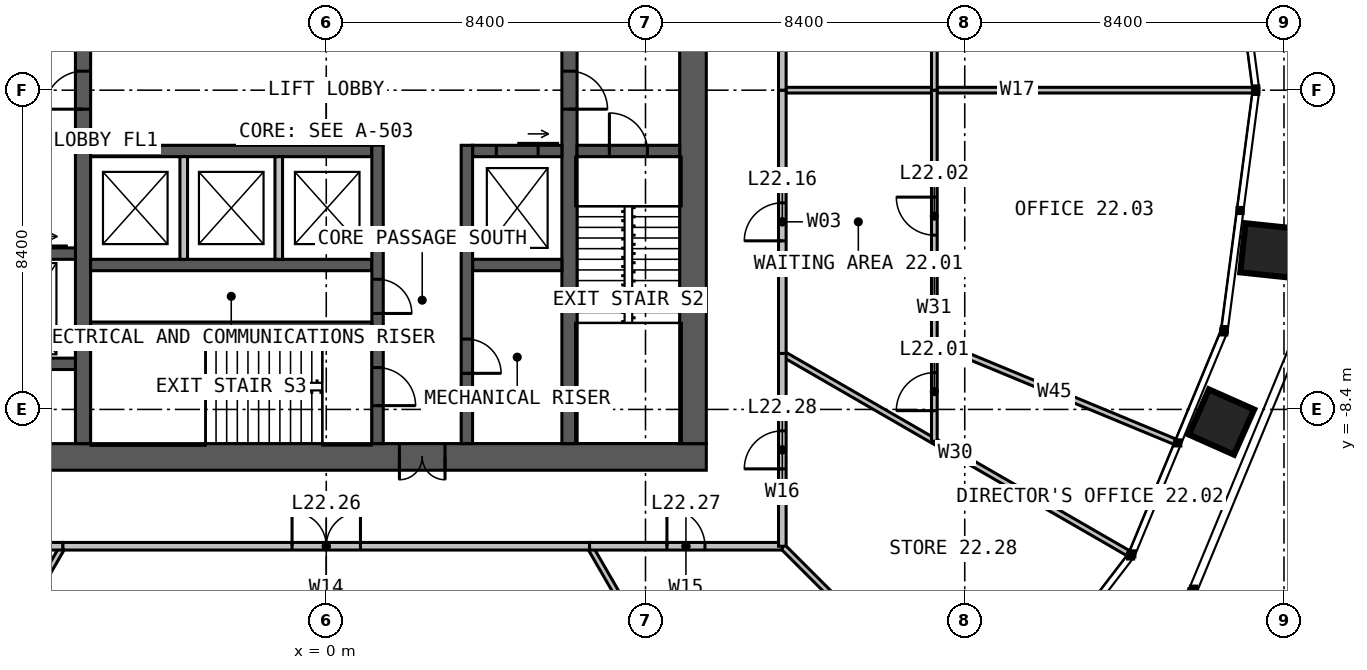
"""IFC4 building model, lengths in metres.
Left out: names, types, materials, properties, quantities, classifications, styles, units other than length and angle.
Written with IfcOpenShell. Run it as: python <this file> out.ifc"""

import sys

from ifc_helpers import new_model, si_unit, direction, frame, frame_2d, origin, place, context, subcontext, project, spatial, rectangle, extrude, element, fill, save


model = new_model("IFC4")
c1 = context("Model", 3, precision=1e-05, world=origin(), true_north=direction((0.0, 1.0)))
c2 = subcontext(c1, "Body", "Model", "MODEL_VIEW")
j1 = project(units=[si_unit("LENGTHUNIT", "METRE"), si_unit("PLANEANGLEUNIT", "RADIAN")], contexts=[c1])
p1 = place(None, origin())
s1 = spatial("IfcSite", under=j1, at=p1, CompositionType="ELEMENT")
p2 = place(p1, origin())
s2 = spatial("IfcBuilding", under=s1, at=p2, CompositionType="ELEMENT")
p3 = place(p2, frame((0.0, 0.0, 94.0)))
s3 = spatial("IfcBuildingStorey", under=s2, at=p3, CompositionType="ELEMENT", Elevation=94.0)
p4 = place(p3, frame((10.0, -9.65, 0.0), z_axis=(0.0, 0.0, 1.0), x_axis=(-1.0, 0.0, 0.0)))
e1 = element("IfcWall", 1, at=p4, inside=s3, PredefinedType="SOLIDWALL", context=c2, shape_type="SweptSolid", body=[
    extrude(rectangle(XDim=20.0, YDim=0.7, at=frame_2d((10.0, 0.0))), origin(), (0.0, 0.0, 1.0), 4.0),
])
p5 = place(p4, frame((6.875, 0.0, 0.0)))
e2 = element("IfcOpeningElement", 2, at=p5, cuts=e1, PredefinedType="OPENING", context=c2, shape_type="SweptSolid", body=[
    extrude(rectangle(XDim=1.2, YDim=2.2, at=frame_2d((0.6, 1.1))), frame((0.0, 0.36, 0.0), z_axis=(0.0, -1.0, 0.0), x_axis=(1.0, 0.0, 0.0)), (0.0, 0.0, 1.0), 0.72),
])
p6 = place(p3, frame((9.65, -9.3, 0.0), z_axis=(0.0, 0.0, 1.0), x_axis=(0.0, 1.0, 0.0)))
e3 = element("IfcWall", 3, at=p6, inside=s3, PredefinedType="SOLIDWALL", context=c2, shape_type="SweptSolid", body=[
    extrude(rectangle(XDim=18.6, YDim=0.7, at=frame_2d((9.3, 0.0))), origin(), (0.0, 0.0, 1.0), 4.0),
])
p7 = place(p3, frame((-6.4, -9.3, 0.0), z_axis=(0.0, 0.0, 1.0), x_axis=(0.0, 1.0, 0.0)))
e4 = element("IfcWall", 4, at=p7, inside=s3, PredefinedType="SOLIDWALL", context=c2, shape_type="SweptSolid", body=[
    extrude(rectangle(XDim=18.6, YDim=0.4, at=frame_2d((9.3, 0.0))), origin(), (0.0, 0.0, 1.0), 4.0),
])
p8 = place(p7, frame((8.8, 0.0, 0.0)))
e5 = element("IfcOpeningElement", 5, at=p8, cuts=e4, PredefinedType="OPENING", context=c2, shape_type="SweptSolid", body=[
    extrude(rectangle(XDim=1.0, YDim=2.2, at=frame_2d((0.5, 1.1))), frame((0.0, 0.21, 0.0), z_axis=(0.0, -1.0, 0.0), x_axis=(1.0, 0.0, 0.0)), (0.0, 0.0, 1.0), 0.42),
])
p9 = place(p3, frame((6.4, 9.3, 0.0), z_axis=(0.0, 0.0, 1.0), x_axis=(0.0, -1.0, 0.0)))
e6 = element("IfcWall", 6, at=p9, inside=s3, PredefinedType="SOLIDWALL", context=c2, shape_type="SweptSolid", body=[
    extrude(rectangle(XDim=18.6, YDim=0.4, at=frame_2d((9.3, 0.0))), origin(), (0.0, 0.0, 1.0), 4.0),
])
p10 = place(p9, frame((8.8, 0.0, 0.0)))
e7 = element("IfcOpeningElement", 7, at=p10, cuts=e6, PredefinedType="OPENING", context=c2, shape_type="SweptSolid", body=[
    extrude(rectangle(XDim=1.0, YDim=2.2, at=frame_2d((0.5, 1.1))), frame((0.0, 0.21, 0.0), z_axis=(0.0, -1.0, 0.0), x_axis=(1.0, 0.0, 0.0)), (0.0, 0.0, 1.0), 0.42),
])
p11 = place(p3, frame((-6.2, -1.6, 0.0), z_axis=(0.0, 0.0, 1.0), x_axis=(1.0, 0.0, 0.0)))
e8 = element("IfcWall", 8, at=p11, inside=s3, PredefinedType="SOLIDWALL", context=c2, shape_type="SweptSolid", body=[
    extrude(rectangle(XDim=7.4, YDim=0.3, at=frame_2d((3.7, 0.0))), origin(), (0.0, 0.0, 1.0), 4.0),
])
p12 = place(p3, frame((3.85, -1.6, 0.0), z_axis=(0.0, 0.0, 1.0), x_axis=(1.0, 0.0, 0.0)))
e9 = element("IfcWall", 9, at=p12, inside=s3, PredefinedType="SOLIDWALL", context=c2, shape_type="SweptSolid", body=[
    extrude(rectangle(XDim=2.35, YDim=0.3, at=frame_2d((1.175, 0.0))), origin(), (0.0, 0.0, 1.0), 4.0),
])
p13 = place(p12, frame((0.625, 0.0, 0.0)))
e10 = element("IfcOpeningElement", 10, at=p13, cuts=e9, PredefinedType="OPENING", context=c2, shape_type="SweptSolid", body=[
    extrude(rectangle(XDim=1.1, YDim=2.2, at=frame_2d((0.55, 1.1))), frame((0.0, 0.16, 0.0), z_axis=(0.0, -1.0, 0.0), x_axis=(1.0, 0.0, 0.0)), (0.0, 0.0, 1.0), 0.32),
])
p14 = place(p3, frame((-6.2, -4.6, 0.0), z_axis=(0.0, 0.0, 1.0), x_axis=(1.0, 0.0, 0.0)))
e11 = element("IfcWall", 11, at=p14, inside=s3, PredefinedType="SOLIDWALL", context=c2, shape_type="SweptSolid", body=[
    extrude(rectangle(XDim=7.4, YDim=0.3, at=frame_2d((3.7, 0.0))), origin(), (0.0, 0.0, 1.0), 4.0),
])
p15 = place(p3, frame((3.85, -4.6, 0.0), z_axis=(0.0, 0.0, 1.0), x_axis=(1.0, 0.0, 0.0)))
e12 = element("IfcWall", 12, at=p15, inside=s3, PredefinedType="SOLIDWALL", context=c2, shape_type="SweptSolid", body=[
    extrude(rectangle(XDim=2.35, YDim=0.3, at=frame_2d((1.175, 0.0))), origin(), (0.0, 0.0, 1.0), 4.0),
])
p16 = place(p3, frame((1.35, -1.45, 0.0), z_axis=(0.0, 0.0, 1.0), x_axis=(0.0, -1.0, 0.0)))
e13 = element("IfcWall", 13, at=p16, inside=s3, PredefinedType="SOLIDWALL", context=c2, shape_type="SweptSolid", body=[
    extrude(rectangle(XDim=7.85, YDim=0.3, at=frame_2d((3.925, 0.0))), origin(), (0.0, 0.0, 1.0), 4.0),
])
p17 = place(p16, frame((5.85, 0.0, 0.0)))
e14 = element("IfcOpeningElement", 14, at=p17, cuts=e13, PredefinedType="OPENING", context=c2, shape_type="SweptSolid", body=[
    extrude(rectangle(XDim=1.0, YDim=2.2, at=frame_2d((0.5, 1.1))), frame((0.0, 0.16, 0.0), z_axis=(0.0, -1.0, 0.0), x_axis=(1.0, 0.0, 0.0)), (0.0, 0.0, 1.0), 0.32),
])
p18 = place(p16, frame((3.525, 0.0, 0.0)))
e15 = element("IfcOpeningElement", 15, at=p18, cuts=e13, PredefinedType="OPENING", context=c2, shape_type="SweptSolid", body=[
    extrude(rectangle(XDim=0.9, YDim=2.2, at=frame_2d((0.45, 1.1))), frame((0.0, 0.16, 0.0), z_axis=(0.0, -1.0, 0.0), x_axis=(1.0, 0.0, 0.0)), (0.0, 0.0, 1.0), 0.32),
])
p19 = place(p3, frame((3.7, -1.45, 0.0), z_axis=(0.0, 0.0, 1.0), x_axis=(0.0, -1.0, 0.0)))
e16 = element("IfcWall", 16, at=p19, inside=s3, PredefinedType="SOLIDWALL", context=c2, shape_type="SweptSolid", body=[
    extrude(rectangle(XDim=7.85, YDim=0.3, at=frame_2d((3.925, 0.0))), origin(), (0.0, 0.0, 1.0), 4.0),
])
p20 = place(p19, frame((5.1, 0.0, 0.0)))
e17 = element("IfcOpeningElement", 17, at=p20, cuts=e16, PredefinedType="OPENING", context=c2, shape_type="SweptSolid", body=[
    extrude(rectangle(XDim=0.9, YDim=2.2, at=frame_2d((0.45, 1.1))), frame((0.0, 0.16, 0.0), z_axis=(0.0, -1.0, 0.0), x_axis=(1.0, 0.0, 0.0)), (0.0, 0.0, 1.0), 0.32),
])
p21 = place(p3, frame((-6.2, -6.2, 0.0), z_axis=(0.0, 0.0, 1.0), x_axis=(1.0, 0.0, 0.0)))
e18 = element("IfcWall", 18, at=p21, inside=s3, PredefinedType="SOLIDWALL", context=c2, shape_type="SweptSolid", body=[
    extrude(rectangle(XDim=7.4, YDim=0.2, at=frame_2d((3.7, 0.0))), origin(), (0.0, 0.0, 1.0), 4.0),
])
p22 = place(p3, frame((6.6, -1.6, 0.0), z_axis=(0.0, 0.0, 1.0), x_axis=(1.0, 0.0, 0.0)))
e19 = element("IfcWall", 19, at=p22, inside=s3, PredefinedType="SOLIDWALL", context=c2, shape_type="SweptSolid", body=[
    extrude(rectangle(XDim=2.7, YDim=0.3, at=frame_2d((1.35, 0.0))), origin(), (0.0, 0.0, 1.0), 4.0),
])
p23 = place(p22, frame((0.85, 0.0, 0.0)))
e20 = element("IfcOpeningElement", 20, at=p23, cuts=e19, PredefinedType="OPENING", context=c2, shape_type="SweptSolid", body=[
    extrude(rectangle(XDim=1.0, YDim=2.2, at=frame_2d((0.5, 1.1))), frame((0.0, 0.16, 0.0), z_axis=(0.0, -1.0, 0.0), x_axis=(1.0, 0.0, 0.0)), (0.0, 0.0, 1.0), 0.32),
])
p24 = place(p3, frame((-9.3, -4.3, 0.0), z_axis=(0.0, 0.0, 1.0), x_axis=(1.0, 0.0, 0.0)))
e21 = element("IfcWall", 21, at=p24, inside=s3, PredefinedType="SOLIDWALL", context=c2, shape_type="SweptSolid", body=[
    extrude(rectangle(XDim=2.7, YDim=0.3, at=frame_2d((1.35, 0.0))), origin(), (0.0, 0.0, 1.0), 4.0),
])
p25 = place(p24, frame((0.85, 0.0, 0.0)))
e22 = element("IfcOpeningElement", 22, at=p25, cuts=e21, PredefinedType="OPENING", context=c2, shape_type="SweptSolid", body=[
    extrude(rectangle(XDim=1.1, YDim=2.2, at=frame_2d((0.55, 1.1))), frame((0.0, 0.16, 0.0), z_axis=(0.0, -1.0, 0.0), x_axis=(1.0, 0.0, 0.0)), (0.0, 0.0, 1.0), 0.32),
])
p26 = place(p3, frame((-9.3, -7.2, 0.0), z_axis=(0.0, 0.0, 1.0), x_axis=(1.0, 0.0, 0.0)))
e23 = element("IfcWall", 23, at=p26, inside=s3, PredefinedType="SOLIDWALL", context=c2, shape_type="SweptSolid", body=[
    extrude(rectangle(XDim=2.7, YDim=0.3, at=frame_2d((1.35, 0.0))), origin(), (0.0, 0.0, 1.0), 4.0),
])
for number, where, z_axis, x_axis in (
    (24, (-3.75, -1.75, 0.0), (0.0, 0.0, 1.0), (0.0, -1.0, 0.0)),
    (25, (-1.25, -1.75, 0.0), (0.0, 0.0, 1.0), (0.0, -1.0, 0.0)),
):
    element("IfcWall", number, at=place(p3, frame(where, z_axis=z_axis, x_axis=x_axis)), inside=s3, PredefinedType="SOLIDWALL", context=c2, shape_type="SweptSolid", body=[
        extrude(rectangle(XDim=2.7, YDim=0.2, at=frame_2d((1.35, 0.0))), origin(), (0.0, 0.0, 1.0), 3.75),
    ])
p27 = place(p3, frame((12.0, -6.928, 0.0), z_axis=(0.0, 0.0, 1.0), x_axis=(0.866028201971, -0.499995153367, 0.0)))
e26 = element("IfcWall", 26, at=p27, inside=s3, PredefinedType="PARTITIONING", context=c2, shape_type="SweptSolid", body=[
    extrude(rectangle(XDim=10.514, YDim=0.15, at=frame_2d((5.257, 0.0))), origin(), (0.0, 0.0, 1.0), 2.79),
])
p28 = place(p3, frame((12.0, 0.0, 0.0), z_axis=(0.0, 0.0, 1.0), x_axis=(1.0, 0.0, 0.0)))
e27 = element("IfcWall", 27, at=p28, inside=s3, PredefinedType="PARTITIONING", context=c2, shape_type="SweptSolid", body=[
    extrude(rectangle(XDim=12.37, YDim=0.15, at=frame_2d((6.185, 0.0))), origin(), (0.0, 0.0, 1.0), 2.79),
])
for number, where, z_axis, x_axis in (
    (28, (-6.928, -12.0, 0.0), (0.0, 0.0, 1.0), (-0.5, -0.866, 0.0)),
    (29, (6.928, -12.0, 0.0), (0.0, 0.0, 1.0), (0.5, -0.866, 0.0)),
):
    element("IfcWall", number, at=place(p3, frame(where, z_axis=z_axis, x_axis=x_axis)), inside=s3, PredefinedType="PARTITIONING", context=c2, shape_type="SweptSolid", body=[
        extrude(rectangle(XDim=10.514, YDim=0.15, at=frame_2d((5.257, 0.0))), origin(), (0.0, 0.0, 1.0), 2.79),
    ])
p29 = place(p3, frame((12.0, -12.0, 0.0), z_axis=(0.0, 0.0, 1.0), x_axis=(0.707106781187, -0.707106781187, 0.0)))
e30 = element("IfcWall", 30, at=p29, inside=s3, PredefinedType="PARTITIONING", context=c2, shape_type="SweptSolid", body=[
    extrude(rectangle(XDim=7.4, YDim=0.15, at=frame_2d((3.7, 0.0))), origin(), (0.0, 0.0, 1.0), 2.79),
])
p30 = place(p3, frame((16.0, -9.238, 0.0), z_axis=(0.0, 0.0, 1.0), x_axis=(0.0, 1.0, 0.0)))
e31 = element("IfcWall", 31, at=p30, inside=s3, PredefinedType="PARTITIONING", context=c2, shape_type="SweptSolid", body=[
    extrude(rectangle(XDim=9.238, YDim=0.15, at=frame_2d((4.619, 0.0))), origin(), (0.0, 0.0, 1.0), 2.79),
])
p31 = place(p30, frame((0.805, 0.0, 0.0)))
e32 = element("IfcOpeningElement", 32, at=p31, cuts=e31, PredefinedType="OPENING", context=c2, shape_type="SweptSolid", body=[
    extrude(rectangle(XDim=1.0, YDim=2.2, at=frame_2d((0.5, 1.1))), frame((0.0, 0.085, 0.0), z_axis=(0.0, -1.0, 0.0), x_axis=(1.0, 0.0, 0.0)), (0.0, 0.0, 1.0), 0.17),
])
p32 = place(p30, frame((5.424, 0.0, 0.0)))
e33 = element("IfcOpeningElement", 33, at=p32, cuts=e31, PredefinedType="OPENING", context=c2, shape_type="SweptSolid", body=[
    extrude(rectangle(XDim=1.0, YDim=2.2, at=frame_2d((0.5, 1.1))), frame((0.0, 0.085, 0.0), z_axis=(0.0, -1.0, 0.0), x_axis=(1.0, 0.0, 0.0)), (0.0, 0.0, 1.0), 0.17),
])
p33 = place(p3, frame((16.0, -6.627, 0.0), z_axis=(0.0, 0.0, 1.0), x_axis=(0.923878127723, -0.382686823805, 0.0)))
e34 = element("IfcWall", 34, at=p33, inside=s3, PredefinedType="PARTITIONING", context=c2, shape_type="SweptSolid", body=[
    extrude(rectangle(XDim=6.844, YDim=0.15, at=frame_2d((3.422, 0.0))), origin(), (0.0, 0.0, 1.0), 2.79),
])
p34 = place(p3, frame((12.0, -6.928, 0.0), z_axis=(0.0, 0.0, 1.0), x_axis=(0.0, 1.0, 0.0)))
e35 = element("IfcWall", 35, at=p34, inside=s3, PredefinedType="PARTITIONING", context=c2, shape_type="SweptSolid", body=[
    extrude(rectangle(XDim=6.928, YDim=0.2, at=frame_2d((3.464, 0.0))), origin(), (0.0, 0.0, 1.0), 3.8),
])
p35 = place(p34, frame((2.964, 0.0, 0.0)))
e36 = element("IfcOpeningElement", 36, at=p35, cuts=e35, PredefinedType="OPENING", context=c2, shape_type="SweptSolid", body=[
    extrude(rectangle(XDim=1.0, YDim=2.2, at=frame_2d((0.5, 1.1))), frame((0.0, 0.11, 0.0), z_axis=(0.0, -1.0, 0.0), x_axis=(1.0, 0.0, 0.0)), (0.0, 0.0, 1.0), 0.22),
])
p36 = place(p3, frame((16.0, 0.0, 0.0), z_axis=(0.0, 0.0, 1.0), x_axis=(0.0, 1.0, 0.0)))
e37 = element("IfcWall", 37, at=p36, inside=s3, PredefinedType="PARTITIONING", context=c2, shape_type="SweptSolid", body=[
    extrude(rectangle(XDim=9.238, YDim=0.15, at=frame_2d((4.619, 0.0))), origin(), (0.0, 0.0, 1.0), 2.79),
])
p37 = place(p36, frame((1.644, 0.0, 0.0)))
e38 = element("IfcOpeningElement", 38, at=p37, cuts=e37, PredefinedType="OPENING", context=c2, shape_type="SweptSolid", body=[
    extrude(rectangle(XDim=1.0, YDim=2.2, at=frame_2d((0.5, 1.1))), frame((0.0, 0.085, 0.0), z_axis=(0.0, -1.0, 0.0), x_axis=(1.0, 0.0, 0.0)), (0.0, 0.0, 1.0), 0.17),
])
p38 = place(p36, frame((6.262, 0.0, 0.0)))
e39 = element("IfcOpeningElement", 39, at=p38, cuts=e37, PredefinedType="OPENING", context=c2, shape_type="SweptSolid", body=[
    extrude(rectangle(XDim=1.0, YDim=2.2, at=frame_2d((0.5, 1.1))), frame((0.0, 0.085, 0.0), z_axis=(0.0, -1.0, 0.0), x_axis=(1.0, 0.0, 0.0)), (0.0, 0.0, 1.0), 0.17),
])
p39 = place(p3, frame((12.0, 0.0, 0.0), z_axis=(0.0, 0.0, 1.0), x_axis=(0.0, 1.0, 0.0)))
e40 = element("IfcWall", 40, at=p39, inside=s3, PredefinedType="PARTITIONING", context=c2, shape_type="SweptSolid", body=[
    extrude(rectangle(XDim=6.928, YDim=0.2, at=frame_2d((3.464, 0.0))), origin(), (0.0, 0.0, 1.0), 3.8),
])
p40 = place(p39, frame((2.964, 0.0, 0.0)))
e41 = element("IfcOpeningElement", 41, at=p40, cuts=e40, PredefinedType="OPENING", context=c2, shape_type="SweptSolid", body=[
    extrude(rectangle(XDim=1.0, YDim=2.2, at=frame_2d((0.5, 1.1))), frame((0.0, 0.11, 0.0), z_axis=(0.0, -1.0, 0.0), x_axis=(1.0, 0.0, 0.0)), (0.0, 0.0, 1.0), 0.22),
])
p41 = place(p3, frame((-12.0, -12.0, 0.0), z_axis=(0.0, 0.0, 1.0), x_axis=(1.0, 0.0, 0.0)))
e42 = element("IfcWall", 42, at=p41, inside=s3, PredefinedType="PARTITIONING", context=c2, shape_type="SweptSolid", body=[
    extrude(rectangle(XDim=5.072, YDim=0.2, at=frame_2d((2.536, 0.0))), origin(), (0.0, 0.0, 1.0), 3.8),
])
p42 = place(p3, frame((-6.928, -12.0, 0.0), z_axis=(0.0, 0.0, 1.0), x_axis=(1.0, 0.0, 0.0)))
e43 = element("IfcWall", 43, at=p42, inside=s3, PredefinedType="PARTITIONING", context=c2, shape_type="SweptSolid", body=[
    extrude(rectangle(XDim=13.856, YDim=0.2, at=frame_2d((6.928, 0.0))), origin(), (0.0, 0.0, 1.0), 3.8),
])
p43 = place(p42, frame((6.028, 0.0, 0.0)))
e44 = element("IfcOpeningElement", 44, at=p43, cuts=e43, PredefinedType="OPENING", context=c2, shape_type="SweptSolid", body=[
    extrude(rectangle(XDim=1.8, YDim=2.2, at=frame_2d((0.9, 1.1))), frame((0.0, 0.11, 0.0), z_axis=(0.0, -1.0, 0.0), x_axis=(1.0, 0.0, 0.0)), (0.0, 0.0, 1.0), 0.22),
])
p44 = place(p3, frame((6.928, -12.0, 0.0), z_axis=(0.0, 0.0, 1.0), x_axis=(1.0, 0.0, 0.0)))
e45 = element("IfcWall", 45, at=p44, inside=s3, PredefinedType="PARTITIONING", context=c2, shape_type="SweptSolid", body=[
    extrude(rectangle(XDim=5.072, YDim=0.2, at=frame_2d((2.536, 0.0))), origin(), (0.0, 0.0, 1.0), 3.8),
])
p45 = place(p44, frame((2.036, 0.0, 0.0)))
e46 = element("IfcOpeningElement", 46, at=p45, cuts=e45, PredefinedType="OPENING", context=c2, shape_type="SweptSolid", body=[
    extrude(rectangle(XDim=1.0, YDim=2.2, at=frame_2d((0.5, 1.1))), frame((0.0, 0.11, 0.0), z_axis=(0.0, -1.0, 0.0), x_axis=(1.0, 0.0, 0.0)), (0.0, 0.0, 1.0), 0.22),
])
p46 = place(p3, frame((12.0, -12.0, 0.0), z_axis=(0.0, 0.0, 1.0), x_axis=(0.0, 1.0, 0.0)))
e47 = element("IfcWall", 47, at=p46, inside=s3, PredefinedType="PARTITIONING", context=c2, shape_type="SweptSolid", body=[
    extrude(rectangle(XDim=5.072, YDim=0.2, at=frame_2d((2.536, 0.0))), origin(), (0.0, 0.0, 1.0), 3.8),
])
p47 = place(p46, frame((2.036, 0.0, 0.0)))
e48 = element("IfcOpeningElement", 48, at=p47, cuts=e47, PredefinedType="OPENING", context=c2, shape_type="SweptSolid", body=[
    extrude(rectangle(XDim=1.0, YDim=2.2, at=frame_2d((0.5, 1.1))), frame((0.0, 0.11, 0.0), z_axis=(0.0, -1.0, 0.0), x_axis=(1.0, 0.0, 0.0)), (0.0, 0.0, 1.0), 0.22),
])
p48 = place(p5, origin())
e49 = element("IfcDoor", 49, at=p48, inside=s3, OperationType="DOUBLE_DOOR_SINGLE_SWING", PredefinedType="DOOR", context=c2, shape_type="SweptSolid", body=[
    extrude(rectangle(XDim=1.2, YDim=2.2, at=frame_2d((0.6, 1.1))), frame((0.0, 0.025, 0.0), z_axis=(0.0, -1.0, 0.0), x_axis=(1.0, 0.0, 0.0)), (0.0, 0.0, 1.0), 0.05),
])
fill(e2, e49)
p49 = place(p8, origin())
e50 = element("IfcDoor", 50, at=p49, inside=s3, OperationType="SINGLE_SWING_LEFT", PredefinedType="DOOR", context=c2, shape_type="SweptSolid", body=[
    extrude(rectangle(XDim=1.0, YDim=2.2, at=frame_2d((0.5, 1.1))), frame((0.0, 0.025, 0.0), z_axis=(0.0, -1.0, 0.0), x_axis=(1.0, 0.0, 0.0)), (0.0, 0.0, 1.0), 0.05),
])
fill(e5, e50)
p50 = place(p10, origin())
e51 = element("IfcDoor", 51, at=p50, inside=s3, OperationType="SINGLE_SWING_RIGHT", PredefinedType="DOOR", context=c2, shape_type="SweptSolid", body=[
    extrude(rectangle(XDim=1.0, YDim=2.2, at=frame_2d((0.5, 1.1))), frame((0.0, 0.025, 0.0), z_axis=(0.0, -1.0, 0.0), x_axis=(1.0, 0.0, 0.0)), (0.0, 0.0, 1.0), 0.05),
])
fill(e7, e51)
p51 = place(p23, origin())
e52 = element("IfcDoor", 52, at=p51, inside=s3, OperationType="SINGLE_SWING_LEFT", PredefinedType="DOOR", context=c2, shape_type="SweptSolid", body=[
    extrude(rectangle(XDim=1.0, YDim=2.2, at=frame_2d((0.5, 1.1))), frame((0.0, 0.025, 0.0), z_axis=(0.0, -1.0, 0.0), x_axis=(1.0, 0.0, 0.0)), (0.0, 0.0, 1.0), 0.05),
])
fill(e20, e52)
p52 = place(p17, origin())
e53 = element("IfcDoor", 53, at=p52, inside=s3, OperationType="SINGLE_SWING_RIGHT", PredefinedType="DOOR", context=c2, shape_type="SweptSolid", body=[
    extrude(rectangle(XDim=1.0, YDim=2.2, at=frame_2d((0.5, 1.1))), frame((0.0, 0.025, 0.0), z_axis=(0.0, -1.0, 0.0), x_axis=(1.0, 0.0, 0.0)), (0.0, 0.0, 1.0), 0.05),
])
fill(e14, e53)
p53 = place(p18, origin())
e54 = element("IfcDoor", 54, at=p53, inside=s3, OperationType="SINGLE_SWING_RIGHT", PredefinedType="DOOR", context=c2, shape_type="SweptSolid", body=[
    extrude(rectangle(XDim=0.9, YDim=2.2, at=frame_2d((0.45, 1.1))), frame((0.0, 0.025, 0.0), z_axis=(0.0, -1.0, 0.0), x_axis=(1.0, 0.0, 0.0)), (0.0, 0.0, 1.0), 0.05),
])
fill(e15, e54)
p54 = place(p20, origin())
e55 = element("IfcDoor", 55, at=p54, inside=s3, OperationType="SINGLE_SWING_RIGHT", PredefinedType="DOOR", context=c2, shape_type="SweptSolid", body=[
    extrude(rectangle(XDim=0.9, YDim=2.2, at=frame_2d((0.45, 1.1))), frame((0.0, 0.025, 0.0), z_axis=(0.0, -1.0, 0.0), x_axis=(1.0, 0.0, 0.0)), (0.0, 0.0, 1.0), 0.05),
])
fill(e17, e55)
p55 = place(p13, origin())
e56 = element("IfcDoor", 56, at=p55, inside=s3, OperationType="SLIDING_TO_LEFT", PredefinedType="DOOR", context=c2, shape_type="SweptSolid", body=[
    extrude(rectangle(XDim=1.1, YDim=2.2, at=frame_2d((0.55, 1.1))), frame((0.0, 0.025, 0.0), z_axis=(0.0, -1.0, 0.0), x_axis=(1.0, 0.0, 0.0)), (0.0, 0.0, 1.0), 0.05),
])
fill(e10, e56)
p56 = place(p31, origin())
e57 = element("IfcDoor", 57, at=p56, inside=s3, OperationType="SINGLE_SWING_LEFT", PredefinedType="DOOR", context=c2, shape_type="SweptSolid", body=[
    extrude(rectangle(XDim=1.0, YDim=2.2, at=frame_2d((0.5, 1.1))), frame((0.0, 0.025, 0.0), z_axis=(0.0, -1.0, 0.0), x_axis=(1.0, 0.0, 0.0)), (0.0, 0.0, 1.0), 0.05),
])
fill(e32, e57)
p57 = place(p32, origin())
e58 = element("IfcDoor", 58, at=p57, inside=s3, OperationType="SINGLE_SWING_RIGHT", PredefinedType="DOOR", context=c2, shape_type="SweptSolid", body=[
    extrude(rectangle(XDim=1.0, YDim=2.2, at=frame_2d((0.5, 1.1))), frame((0.0, 0.025, 0.0), z_axis=(0.0, -1.0, 0.0), x_axis=(1.0, 0.0, 0.0)), (0.0, 0.0, 1.0), 0.05),
])
fill(e33, e58)
p58 = place(p35, origin())
e59 = element("IfcDoor", 59, at=p58, inside=s3, OperationType="SINGLE_SWING_LEFT", PredefinedType="DOOR", context=c2, shape_type="SweptSolid", body=[
    extrude(rectangle(XDim=1.0, YDim=2.2, at=frame_2d((0.5, 1.1))), frame((0.0, 0.025, 0.0), z_axis=(0.0, -1.0, 0.0), x_axis=(1.0, 0.0, 0.0)), (0.0, 0.0, 1.0), 0.05),
])
fill(e36, e59)
p59 = place(p43, origin())
e60 = element("IfcDoor", 60, at=p59, inside=s3, OperationType="DOUBLE_DOOR_SINGLE_SWING", PredefinedType="DOOR", context=c2, shape_type="SweptSolid", body=[
    extrude(rectangle(XDim=1.8, YDim=2.2, at=frame_2d((0.9, 1.1))), frame((0.0, 0.025, 0.0), z_axis=(0.0, -1.0, 0.0), x_axis=(1.0, 0.0, 0.0)), (0.0, 0.0, 1.0), 0.05),
])
fill(e44, e60)
p60 = place(p45, origin())
e61 = element("IfcDoor", 61, at=p60, inside=s3, OperationType="SINGLE_SWING_LEFT", PredefinedType="DOOR", context=c2, shape_type="SweptSolid", body=[
    extrude(rectangle(XDim=1.0, YDim=2.2, at=frame_2d((0.5, 1.1))), frame((0.0, 0.025, 0.0), z_axis=(0.0, -1.0, 0.0), x_axis=(1.0, 0.0, 0.0)), (0.0, 0.0, 1.0), 0.05),
])
fill(e46, e61)
p61 = place(p47, origin())
e62 = element("IfcDoor", 62, at=p61, inside=s3, OperationType="SINGLE_SWING_LEFT", PredefinedType="DOOR", context=c2, shape_type="SweptSolid", body=[
    extrude(rectangle(XDim=1.0, YDim=2.2, at=frame_2d((0.5, 1.1))), frame((0.0, 0.025, 0.0), z_axis=(0.0, -1.0, 0.0), x_axis=(1.0, 0.0, 0.0)), (0.0, 0.0, 1.0), 0.05),
])
fill(e48, e62)
save(model, sys.argv[1])
